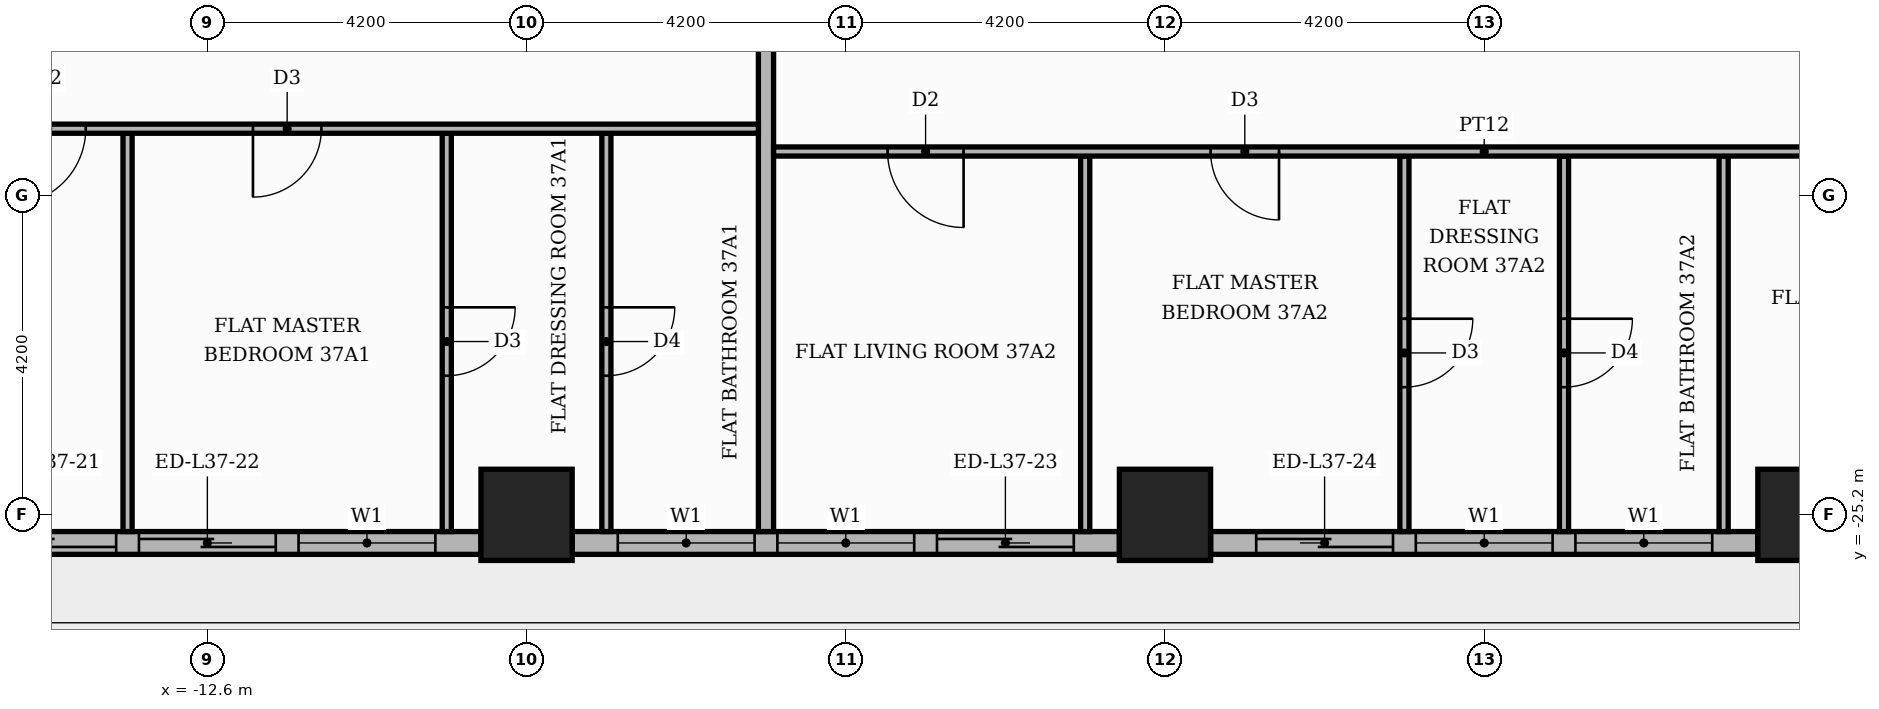
"""IFC4 building model, lengths in metres.
Left out: names, types, materials, properties, quantities, classifications, styles, units other than length and angle.
Written with IfcOpenShell. Run it as: python <this file> out.ifc"""

import sys

from ifc_helpers import new_model, si_unit, direction, frame, frame_2d, origin, origin_2d, place, context, subcontext, project, spatial, rectangle, extrude, element, fill, save


model = new_model("IFC4")
c1 = context("Model", 3, precision=1e-05, world=origin(), true_north=direction((0.0, 1.0)))
c2 = subcontext(c1, "Body", "Model", "MODEL_VIEW")
j1 = project(units=[si_unit("LENGTHUNIT", "METRE"), si_unit("PLANEANGLEUNIT", "RADIAN")], contexts=[c1])
p1 = place(None, origin())
s1 = spatial("IfcSite", under=j1, at=p1, CompositionType="ELEMENT")
p2 = place(p1, origin())
s2 = spatial("IfcBuilding", under=s1, at=p2, CompositionType="ELEMENT")
p3 = place(p2, frame((0.0, 0.0, 157.2)))
s3 = spatial("IfcBuildingStorey", under=s2, at=p3, CompositionType="ELEMENT", Elevation=157.2)
for number, where, z_axis, x_axis in (
    (1, (0.0, -25.2, 0.0), (0.0, 0.0, 1.0), (1.0, 0.0, 0.0)),
    (2, (8.4, -25.2, 0.0), (0.0, 0.0, 1.0), (1.0, 0.0, 0.0)),
    (3, (-8.4, -25.2, 0.0), (0.0, 0.0, 1.0), (1.0, 0.0, 0.0)),
):
    element("IfcColumn", number, at=place(p3, frame(where, z_axis=z_axis, x_axis=x_axis)), inside=s3, PredefinedType="COLUMN", context=c2, shape_type="SweptSolid", body=[
        extrude(rectangle(XDim=1.2, YDim=1.2, at=origin_2d()), origin(), (0.0, 0.0, 1.0), 3.9),
    ])
p4 = place(p3, frame((-16.2, -25.57, 0.0), z_axis=(0.0, 0.0, 1.0), x_axis=(1.0, 0.0, 0.0)))
e4 = element("IfcWall", 4, at=p4, inside=s3, PredefinedType="STANDARD", context=c2, shape_type="SweptSolid", body=[
    extrude(rectangle(XDim=7.2, YDim=0.3, at=frame_2d((3.6, 0.0))), origin(), (0.0, 0.0, 1.0), 3.48),
])
p5 = place(p4, frame((0.6, 0.0, 0.0)))
e5 = element("IfcOpeningElement", 5, at=p5, cuts=e4, PredefinedType="OPENING", context=c2, shape_type="SweptSolid", body=[
    extrude(rectangle(XDim=1.8, YDim=2.4, at=frame_2d((0.9, 1.2))), frame((0.0, 0.16, 0.0), z_axis=(0.0, -1.0, 0.0), x_axis=(1.0, 0.0, 0.0)), (0.0, 0.0, 1.0), 0.32),
])
p6 = place(p4, frame((2.7, 0.0, 0.0)))
e6 = element("IfcOpeningElement", 6, at=p6, cuts=e4, PredefinedType="OPENING", context=c2, shape_type="SweptSolid", body=[
    extrude(rectangle(XDim=1.8, YDim=2.4, at=frame_2d((0.9, 1.2))), frame((0.0, 0.16, 0.0), z_axis=(0.0, -1.0, 0.0), x_axis=(1.0, 0.0, 0.0)), (0.0, 0.0, 1.0), 0.32),
])
p7 = place(p4, frame((4.8, 0.0, 0.9)))
e7 = element("IfcOpeningElement", 7, at=p7, cuts=e4, PredefinedType="OPENING", context=c2, shape_type="SweptSolid", body=[
    extrude(rectangle(XDim=1.8, YDim=2.1, at=frame_2d((0.9, 1.05))), frame((0.0, 0.16, 0.0), z_axis=(0.0, -1.0, 0.0), x_axis=(1.0, 0.0, 0.0)), (0.0, 0.0, 1.0), 0.32),
])
p8 = place(p3, frame((-7.8, -25.57, 0.0), z_axis=(0.0, 0.0, 1.0), x_axis=(1.0, 0.0, 0.0)))
e8 = element("IfcWall", 8, at=p8, inside=s3, PredefinedType="STANDARD", context=c2, shape_type="SweptSolid", body=[
    extrude(rectangle(XDim=7.2, YDim=0.3, at=frame_2d((3.6, 0.0))), origin(), (0.0, 0.0, 1.0), 3.48),
])
p9 = place(p8, frame((0.6, 0.0, 0.9)))
e9 = element("IfcOpeningElement", 9, at=p9, cuts=e8, PredefinedType="OPENING", context=c2, shape_type="SweptSolid", body=[
    extrude(rectangle(XDim=1.8, YDim=2.1, at=frame_2d((0.9, 1.05))), frame((0.0, 0.16, 0.0), z_axis=(0.0, -1.0, 0.0), x_axis=(1.0, 0.0, 0.0)), (0.0, 0.0, 1.0), 0.32),
])
p10 = place(p8, frame((2.7, 0.0, 0.9)))
e10 = element("IfcOpeningElement", 10, at=p10, cuts=e8, PredefinedType="OPENING", context=c2, shape_type="SweptSolid", body=[
    extrude(rectangle(XDim=1.8, YDim=2.1, at=frame_2d((0.9, 1.05))), frame((0.0, 0.16, 0.0), z_axis=(0.0, -1.0, 0.0), x_axis=(1.0, 0.0, 0.0)), (0.0, 0.0, 1.0), 0.32),
])
p11 = place(p8, frame((4.8, 0.0, 0.0)))
e11 = element("IfcOpeningElement", 11, at=p11, cuts=e8, PredefinedType="OPENING", context=c2, shape_type="SweptSolid", body=[
    extrude(rectangle(XDim=1.8, YDim=2.4, at=frame_2d((0.9, 1.2))), frame((0.0, 0.16, 0.0), z_axis=(0.0, -1.0, 0.0), x_axis=(1.0, 0.0, 0.0)), (0.0, 0.0, 1.0), 0.32),
])
p12 = place(p3, frame((0.6, -25.57, 0.0), z_axis=(0.0, 0.0, 1.0), x_axis=(1.0, 0.0, 0.0)))
e12 = element("IfcWall", 12, at=p12, inside=s3, PredefinedType="STANDARD", context=c2, shape_type="SweptSolid", body=[
    extrude(rectangle(XDim=7.2, YDim=0.3, at=frame_2d((3.6, 0.0))), origin(), (0.0, 0.0, 1.0), 3.48),
])
p13 = place(p12, frame((0.6, 0.0, 0.0)))
e13 = element("IfcOpeningElement", 13, at=p13, cuts=e12, PredefinedType="OPENING", context=c2, shape_type="SweptSolid", body=[
    extrude(rectangle(XDim=1.8, YDim=2.4, at=frame_2d((0.9, 1.2))), frame((0.0, 0.16, 0.0), z_axis=(0.0, -1.0, 0.0), x_axis=(1.0, 0.0, 0.0)), (0.0, 0.0, 1.0), 0.32),
])
p14 = place(p12, frame((2.7, 0.0, 0.9)))
e14 = element("IfcOpeningElement", 14, at=p14, cuts=e12, PredefinedType="OPENING", context=c2, shape_type="SweptSolid", body=[
    extrude(rectangle(XDim=1.8, YDim=2.1, at=frame_2d((0.9, 1.05))), frame((0.0, 0.16, 0.0), z_axis=(0.0, -1.0, 0.0), x_axis=(1.0, 0.0, 0.0)), (0.0, 0.0, 1.0), 0.32),
])
p15 = place(p12, frame((4.8, 0.0, 0.9)))
e15 = element("IfcOpeningElement", 15, at=p15, cuts=e12, PredefinedType="OPENING", context=c2, shape_type="SweptSolid", body=[
    extrude(rectangle(XDim=1.8, YDim=2.1, at=frame_2d((0.9, 1.05))), frame((0.0, 0.16, 0.0), z_axis=(0.0, -1.0, 0.0), x_axis=(1.0, 0.0, 0.0)), (0.0, 0.0, 1.0), 0.32),
])
p16 = place(p3, frame((-13.65, -25.42, 0.0), z_axis=(0.0, 0.0, 1.0), x_axis=(0.0, 1.0, 0.0)))
e16 = element("IfcWall", 16, at=p16, inside=s3, PredefinedType="PARTITIONING", context=c2, shape_type="SweptSolid", body=[
    extrude(rectangle(XDim=5.24, YDim=0.12, at=frame_2d((2.62, 0.0))), origin(), (0.0, 0.0, 1.0), 3.48),
])
p17 = place(p3, frame((-9.45, -25.42, 0.0), z_axis=(0.0, 0.0, 1.0), x_axis=(0.0, 1.0, 0.0)))
e17 = element("IfcWall", 17, at=p17, inside=s3, PredefinedType="PARTITIONING", context=c2, shape_type="SweptSolid", body=[
    extrude(rectangle(XDim=5.24, YDim=0.12, at=frame_2d((2.62, 0.0))), origin(), (0.0, 0.0, 1.0), 3.48),
])
p18 = place(p17, frame((2.05, 0.0, 0.0)))
e18 = element("IfcOpeningElement", 18, at=p18, cuts=e17, PredefinedType="OPENING", context=c2, shape_type="SweptSolid", body=[
    extrude(rectangle(XDim=0.9, YDim=2.1, at=frame_2d((0.45, 1.05))), frame((0.0, 0.07, 0.0), z_axis=(0.0, -1.0, 0.0), x_axis=(1.0, 0.0, 0.0)), (0.0, 0.0, 1.0), 0.14),
])
p19 = place(p3, frame((-7.35, -25.42, 0.0), z_axis=(0.0, 0.0, 1.0), x_axis=(0.0, 1.0, 0.0)))
e19 = element("IfcWall", 19, at=p19, inside=s3, PredefinedType="PARTITIONING", context=c2, shape_type="SweptSolid", body=[
    extrude(rectangle(XDim=5.24, YDim=0.12, at=frame_2d((2.62, 0.0))), origin(), (0.0, 0.0, 1.0), 3.48),
])
p20 = place(p19, frame((2.05, 0.0, 0.0)))
e20 = element("IfcOpeningElement", 20, at=p20, cuts=e19, PredefinedType="OPENING", context=c2, shape_type="SweptSolid", body=[
    extrude(rectangle(XDim=0.9, YDim=2.1, at=frame_2d((0.45, 1.05))), frame((0.0, 0.07, 0.0), z_axis=(0.0, -1.0, 0.0), x_axis=(1.0, 0.0, 0.0)), (0.0, 0.0, 1.0), 0.14),
])
p21 = place(p3, frame((-5.25, -25.42, 0.0), z_axis=(0.0, 0.0, 1.0), x_axis=(0.0, 1.0, 0.0)))
e21 = element("IfcWall", 21, at=p21, inside=s3, PredefinedType="PARTITIONING", context=c2, shape_type="SweptSolid", body=[
    extrude(rectangle(XDim=11.67, YDim=0.2, at=frame_2d((5.835, 0.0))), origin(), (0.0, 0.0, 1.0), 3.48),
])
p22 = place(p3, frame((-1.05, -25.42, 0.0), z_axis=(0.0, 0.0, 1.0), x_axis=(0.0, 1.0, 0.0)))
e22 = element("IfcWall", 22, at=p22, inside=s3, PredefinedType="PARTITIONING", context=c2, shape_type="SweptSolid", body=[
    extrude(rectangle(XDim=4.94, YDim=0.12, at=frame_2d((2.47, 0.0))), origin(), (0.0, 0.0, 1.0), 3.48),
])
p23 = place(p3, frame((3.15, -25.42, 0.0), z_axis=(0.0, 0.0, 1.0), x_axis=(0.0, 1.0, 0.0)))
e23 = element("IfcWall", 23, at=p23, inside=s3, PredefinedType="PARTITIONING", context=c2, shape_type="SweptSolid", body=[
    extrude(rectangle(XDim=4.94, YDim=0.12, at=frame_2d((2.47, 0.0))), origin(), (0.0, 0.0, 1.0), 3.48),
])
p24 = place(p23, frame((1.9, 0.0, 0.0)))
e24 = element("IfcOpeningElement", 24, at=p24, cuts=e23, PredefinedType="OPENING", context=c2, shape_type="SweptSolid", body=[
    extrude(rectangle(XDim=0.9, YDim=2.1, at=frame_2d((0.45, 1.05))), frame((0.0, 0.07, 0.0), z_axis=(0.0, -1.0, 0.0), x_axis=(1.0, 0.0, 0.0)), (0.0, 0.0, 1.0), 0.14),
])
p25 = place(p3, frame((5.25, -25.42, 0.0), z_axis=(0.0, 0.0, 1.0), x_axis=(0.0, 1.0, 0.0)))
e25 = element("IfcWall", 25, at=p25, inside=s3, PredefinedType="PARTITIONING", context=c2, shape_type="SweptSolid", body=[
    extrude(rectangle(XDim=4.94, YDim=0.12, at=frame_2d((2.47, 0.0))), origin(), (0.0, 0.0, 1.0), 3.48),
])
p26 = place(p25, frame((1.9, 0.0, 0.0)))
e26 = element("IfcOpeningElement", 26, at=p26, cuts=e25, PredefinedType="OPENING", context=c2, shape_type="SweptSolid", body=[
    extrude(rectangle(XDim=0.9, YDim=2.1, at=frame_2d((0.45, 1.05))), frame((0.0, 0.07, 0.0), z_axis=(0.0, -1.0, 0.0), x_axis=(1.0, 0.0, 0.0)), (0.0, 0.0, 1.0), 0.14),
])
p27 = place(p3, frame((7.35, -25.42, 0.0), z_axis=(0.0, 0.0, 1.0), x_axis=(0.0, 1.0, 0.0)))
e27 = element("IfcWall", 27, at=p27, inside=s3, PredefinedType="PARTITIONING", context=c2, shape_type="SweptSolid", body=[
    extrude(rectangle(XDim=4.94, YDim=0.12, at=frame_2d((2.47, 0.0))), origin(), (0.0, 0.0, 1.0), 3.48),
])
p28 = place(p3, frame((-5.15, -20.42, 0.0), z_axis=(0.0, 0.0, 1.0), x_axis=(1.0, 0.0, 0.0)))
e28 = element("IfcWall", 28, at=p28, inside=s3, PredefinedType="PARTITIONING", context=c2, shape_type="SweptSolid", body=[
    extrude(rectangle(XDim=18.7, YDim=0.12, at=frame_2d((9.35, 0.0))), origin(), (0.0, 0.0, 1.0), 3.48),
])
p29 = place(p28, frame((1.5, 0.0, 0.0)))
e29 = element("IfcOpeningElement", 29, at=p29, cuts=e28, PredefinedType="OPENING", context=c2, shape_type="SweptSolid", body=[
    extrude(rectangle(XDim=1.0, YDim=2.1, at=frame_2d((0.5, 1.05))), frame((0.0, 0.07, 0.0), z_axis=(0.0, -1.0, 0.0), x_axis=(1.0, 0.0, 0.0)), (0.0, 0.0, 1.0), 0.14),
])
p30 = place(p28, frame((5.75, 0.0, 0.0)))
e30 = element("IfcOpeningElement", 30, at=p30, cuts=e28, PredefinedType="OPENING", context=c2, shape_type="SweptSolid", body=[
    extrude(rectangle(XDim=0.9, YDim=2.1, at=frame_2d((0.45, 1.05))), frame((0.0, 0.07, 0.0), z_axis=(0.0, -1.0, 0.0), x_axis=(1.0, 0.0, 0.0)), (0.0, 0.0, 1.0), 0.14),
])
p31 = place(p28, frame((14.15, 0.0, 0.0)))
e31 = element("IfcOpeningElement", 31, at=p31, cuts=e28, PredefinedType="OPENING", context=c2, shape_type="SweptSolid", body=[
    extrude(rectangle(XDim=0.9, YDim=2.1, at=frame_2d((0.45, 1.05))), frame((0.0, 0.07, 0.0), z_axis=(0.0, -1.0, 0.0), x_axis=(1.0, 0.0, 0.0)), (0.0, 0.0, 1.0), 0.14),
])
p32 = place(p3, frame((-25.42, -20.12, 0.0), z_axis=(0.0, 0.0, 1.0), x_axis=(1.0, 0.0, 0.0)))
e32 = element("IfcWall", 32, at=p32, inside=s3, PredefinedType="PARTITIONING", context=c2, shape_type="SweptSolid", body=[
    extrude(rectangle(XDim=20.07, YDim=0.12, at=frame_2d((10.035, 0.0))), origin(), (0.0, 0.0, 1.0), 3.48),
])
p33 = place(p32, frame((10.22, 0.0, 0.0)))
e33 = element("IfcOpeningElement", 33, at=p33, cuts=e32, PredefinedType="OPENING", context=c2, shape_type="SweptSolid", body=[
    extrude(rectangle(XDim=1.0, YDim=2.1, at=frame_2d((0.5, 1.05))), frame((0.0, 0.07, 0.0), z_axis=(0.0, -1.0, 0.0), x_axis=(1.0, 0.0, 0.0)), (0.0, 0.0, 1.0), 0.14),
])
p34 = place(p32, frame((13.42, 0.0, 0.0)))
e34 = element("IfcOpeningElement", 34, at=p34, cuts=e32, PredefinedType="OPENING", context=c2, shape_type="SweptSolid", body=[
    extrude(rectangle(XDim=0.9, YDim=2.1, at=frame_2d((0.45, 1.05))), frame((0.0, 0.07, 0.0), z_axis=(0.0, -1.0, 0.0), x_axis=(1.0, 0.0, 0.0)), (0.0, 0.0, 1.0), 0.14),
])
p35 = place(p5, origin())
e35 = element("IfcDoor", 35, at=p35, inside=s3, OperationType="SLIDING_TO_LEFT", PredefinedType="DOOR", context=c2, shape_type="SweptSolid", body=[
    extrude(rectangle(XDim=1.8, YDim=2.4, at=frame_2d((0.9, 1.2))), frame((0.0, 0.025, 0.0), z_axis=(0.0, -1.0, 0.0), x_axis=(1.0, 0.0, 0.0)), (0.0, 0.0, 1.0), 0.05),
])
fill(e5, e35)
p36 = place(p6, origin())
e36 = element("IfcDoor", 36, at=p36, inside=s3, OperationType="SLIDING_TO_RIGHT", PredefinedType="DOOR", context=c2, shape_type="SweptSolid", body=[
    extrude(rectangle(XDim=1.8, YDim=2.4, at=frame_2d((0.9, 1.2))), frame((0.0, 0.025, 0.0), z_axis=(0.0, -1.0, 0.0), x_axis=(1.0, 0.0, 0.0)), (0.0, 0.0, 1.0), 0.05),
])
fill(e6, e36)
p37 = place(p7, origin())
e37 = element("IfcWindow", 37, at=p37, inside=s3, PartitioningType="SINGLE_PANEL", PredefinedType="WINDOW", context=c2, shape_type="SweptSolid", body=[
    extrude(rectangle(XDim=1.8, YDim=2.1, at=frame_2d((0.9, 1.05))), frame((0.0, 0.03, 0.0), z_axis=(0.0, -1.0, 0.0), x_axis=(1.0, 0.0, 0.0)), (0.0, 0.0, 1.0), 0.06),
])
fill(e7, e37)
p38 = place(p9, origin())
e38 = element("IfcWindow", 38, at=p38, inside=s3, PartitioningType="SINGLE_PANEL", PredefinedType="WINDOW", context=c2, shape_type="SweptSolid", body=[
    extrude(rectangle(XDim=1.8, YDim=2.1, at=frame_2d((0.9, 1.05))), frame((0.0, 0.03, 0.0), z_axis=(0.0, -1.0, 0.0), x_axis=(1.0, 0.0, 0.0)), (0.0, 0.0, 1.0), 0.06),
])
fill(e9, e38)
p39 = place(p10, origin())
e39 = element("IfcWindow", 39, at=p39, inside=s3, PartitioningType="SINGLE_PANEL", PredefinedType="WINDOW", context=c2, shape_type="SweptSolid", body=[
    extrude(rectangle(XDim=1.8, YDim=2.1, at=frame_2d((0.9, 1.05))), frame((0.0, 0.03, 0.0), z_axis=(0.0, -1.0, 0.0), x_axis=(1.0, 0.0, 0.0)), (0.0, 0.0, 1.0), 0.06),
])
fill(e10, e39)
p40 = place(p11, origin())
e40 = element("IfcDoor", 40, at=p40, inside=s3, OperationType="SLIDING_TO_RIGHT", PredefinedType="DOOR", context=c2, shape_type="SweptSolid", body=[
    extrude(rectangle(XDim=1.8, YDim=2.4, at=frame_2d((0.9, 1.2))), frame((0.0, 0.025, 0.0), z_axis=(0.0, -1.0, 0.0), x_axis=(1.0, 0.0, 0.0)), (0.0, 0.0, 1.0), 0.05),
])
fill(e11, e40)
p41 = place(p13, origin())
e41 = element("IfcDoor", 41, at=p41, inside=s3, OperationType="SLIDING_TO_LEFT", PredefinedType="DOOR", context=c2, shape_type="SweptSolid", body=[
    extrude(rectangle(XDim=1.8, YDim=2.4, at=frame_2d((0.9, 1.2))), frame((0.0, 0.025, 0.0), z_axis=(0.0, -1.0, 0.0), x_axis=(1.0, 0.0, 0.0)), (0.0, 0.0, 1.0), 0.05),
])
fill(e13, e41)
p42 = place(p14, origin())
e42 = element("IfcWindow", 42, at=p42, inside=s3, PartitioningType="SINGLE_PANEL", PredefinedType="WINDOW", context=c2, shape_type="SweptSolid", body=[
    extrude(rectangle(XDim=1.8, YDim=2.1, at=frame_2d((0.9, 1.05))), frame((0.0, 0.03, 0.0), z_axis=(0.0, -1.0, 0.0), x_axis=(1.0, 0.0, 0.0)), (0.0, 0.0, 1.0), 0.06),
])
fill(e14, e42)
p43 = place(p15, origin())
e43 = element("IfcWindow", 43, at=p43, inside=s3, PartitioningType="SINGLE_PANEL", PredefinedType="WINDOW", context=c2, shape_type="SweptSolid", body=[
    extrude(rectangle(XDim=1.8, YDim=2.1, at=frame_2d((0.9, 1.05))), frame((0.0, 0.03, 0.0), z_axis=(0.0, -1.0, 0.0), x_axis=(1.0, 0.0, 0.0)), (0.0, 0.0, 1.0), 0.06),
])
fill(e15, e43)
p44 = place(p33, frame((1.0, 0.0, 0.0), z_axis=(0.0, 0.0, 1.0), x_axis=(-1.0, 0.0, 0.0)))
e44 = element("IfcDoor", 44, at=p44, inside=s3, OperationType="SINGLE_SWING_LEFT", PredefinedType="DOOR", context=c2, shape_type="SweptSolid", body=[
    extrude(rectangle(XDim=1.0, YDim=2.1, at=frame_2d((0.5, 1.05))), frame((0.0, 0.025, 0.0), z_axis=(0.0, -1.0, 0.0), x_axis=(1.0, 0.0, 0.0)), (0.0, 0.0, 1.0), 0.05),
])
fill(e33, e44)
p45 = place(p34, frame((0.9, 0.0, 0.0), z_axis=(0.0, 0.0, 1.0), x_axis=(-1.0, 0.0, 0.0)))
e45 = element("IfcDoor", 45, at=p45, inside=s3, OperationType="SINGLE_SWING_LEFT", PredefinedType="DOOR", context=c2, shape_type="SweptSolid", body=[
    extrude(rectangle(XDim=0.9, YDim=2.1, at=frame_2d((0.45, 1.05))), frame((0.0, 0.025, 0.0), z_axis=(0.0, -1.0, 0.0), x_axis=(1.0, 0.0, 0.0)), (0.0, 0.0, 1.0), 0.05),
])
fill(e34, e45)
p46 = place(p18, frame((0.9, 0.0, 0.0), z_axis=(0.0, 0.0, 1.0), x_axis=(-1.0, 0.0, 0.0)))
e46 = element("IfcDoor", 46, at=p46, inside=s3, OperationType="SINGLE_SWING_RIGHT", PredefinedType="DOOR", context=c2, shape_type="SweptSolid", body=[
    extrude(rectangle(XDim=0.9, YDim=2.1, at=frame_2d((0.45, 1.05))), frame((0.0, 0.025, 0.0), z_axis=(0.0, -1.0, 0.0), x_axis=(1.0, 0.0, 0.0)), (0.0, 0.0, 1.0), 0.05),
])
fill(e18, e46)
p47 = place(p20, frame((0.9, 0.0, 0.0), z_axis=(0.0, 0.0, 1.0), x_axis=(-1.0, 0.0, 0.0)))
e47 = element("IfcDoor", 47, at=p47, inside=s3, OperationType="SINGLE_SWING_RIGHT", PredefinedType="DOOR", context=c2, shape_type="SweptSolid", body=[
    extrude(rectangle(XDim=0.9, YDim=2.1, at=frame_2d((0.45, 1.05))), frame((0.0, 0.025, 0.0), z_axis=(0.0, -1.0, 0.0), x_axis=(1.0, 0.0, 0.0)), (0.0, 0.0, 1.0), 0.05),
])
fill(e20, e47)
p48 = place(p29, frame((1.0, 0.0, 0.0), z_axis=(0.0, 0.0, 1.0), x_axis=(-1.0, 0.0, 0.0)))
e48 = element("IfcDoor", 48, at=p48, inside=s3, OperationType="SINGLE_SWING_RIGHT", PredefinedType="DOOR", context=c2, shape_type="SweptSolid", body=[
    extrude(rectangle(XDim=1.0, YDim=2.1, at=frame_2d((0.5, 1.05))), frame((0.0, 0.025, 0.0), z_axis=(0.0, -1.0, 0.0), x_axis=(1.0, 0.0, 0.0)), (0.0, 0.0, 1.0), 0.05),
])
fill(e29, e48)
p49 = place(p30, frame((0.9, 0.0, 0.0), z_axis=(0.0, 0.0, 1.0), x_axis=(-1.0, 0.0, 0.0)))
e49 = element("IfcDoor", 49, at=p49, inside=s3, OperationType="SINGLE_SWING_RIGHT", PredefinedType="DOOR", context=c2, shape_type="SweptSolid", body=[
    extrude(rectangle(XDim=0.9, YDim=2.1, at=frame_2d((0.45, 1.05))), frame((0.0, 0.025, 0.0), z_axis=(0.0, -1.0, 0.0), x_axis=(1.0, 0.0, 0.0)), (0.0, 0.0, 1.0), 0.05),
])
fill(e30, e49)
p50 = place(p24, frame((0.9, 0.0, 0.0), z_axis=(0.0, 0.0, 1.0), x_axis=(-1.0, 0.0, 0.0)))
e50 = element("IfcDoor", 50, at=p50, inside=s3, OperationType="SINGLE_SWING_RIGHT", PredefinedType="DOOR", context=c2, shape_type="SweptSolid", body=[
    extrude(rectangle(XDim=0.9, YDim=2.1, at=frame_2d((0.45, 1.05))), frame((0.0, 0.025, 0.0), z_axis=(0.0, -1.0, 0.0), x_axis=(1.0, 0.0, 0.0)), (0.0, 0.0, 1.0), 0.05),
])
fill(e24, e50)
p51 = place(p26, frame((0.9, 0.0, 0.0), z_axis=(0.0, 0.0, 1.0), x_axis=(-1.0, 0.0, 0.0)))
e51 = element("IfcDoor", 51, at=p51, inside=s3, OperationType="SINGLE_SWING_RIGHT", PredefinedType="DOOR", context=c2, shape_type="SweptSolid", body=[
    extrude(rectangle(XDim=0.9, YDim=2.1, at=frame_2d((0.45, 1.05))), frame((0.0, 0.025, 0.0), z_axis=(0.0, -1.0, 0.0), x_axis=(1.0, 0.0, 0.0)), (0.0, 0.0, 1.0), 0.05),
])
fill(e26, e51)
save(model, sys.argv[1])
